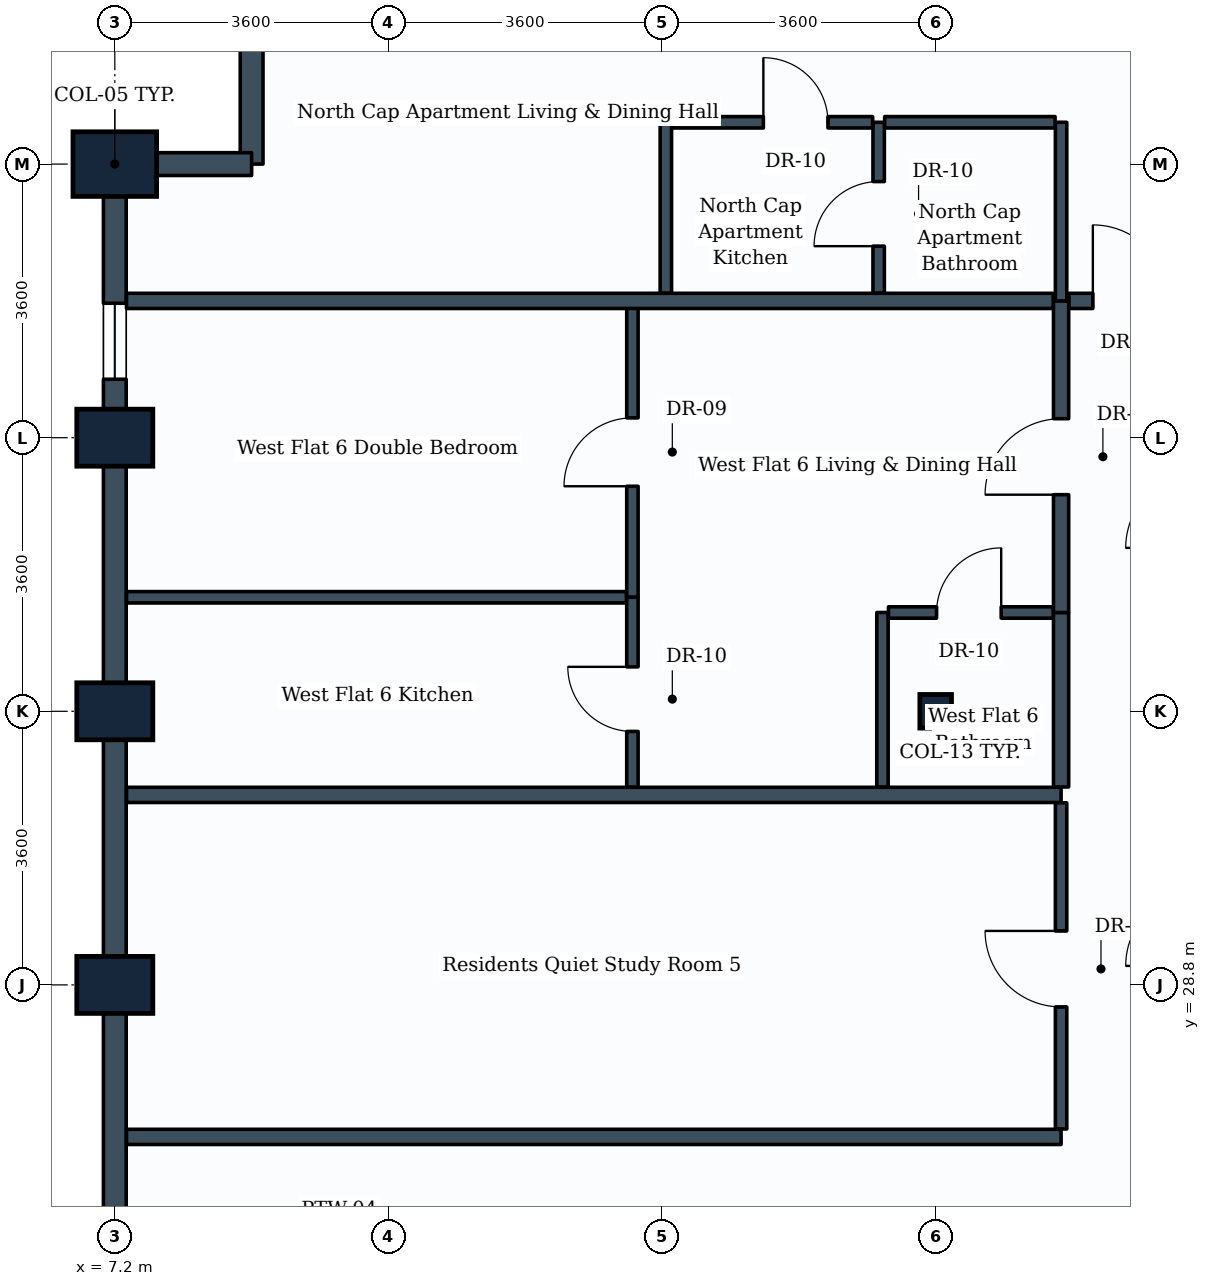
"""IFC4 building model, lengths in metres.
Left out: names, types, materials, properties, quantities, classifications, styles, units other than length and angle.
Written with IfcOpenShell. Run it as: python <this file> out.ifc"""

import sys

from ifc_helpers import new_model, si_unit, direction, frame, frame_2d, origin, origin_2d, place, context, subcontext, project, spatial, rectangle, i_section, extrude, element, fill, save


model = new_model("IFC4")
c1 = context("Model", 3, precision=1e-05, world=origin(), true_north=direction((0.0, 1.0)))
c2 = subcontext(c1, "Body", "Model", "MODEL_VIEW")
j1 = project(units=[si_unit("LENGTHUNIT", "METRE"), si_unit("PLANEANGLEUNIT", "RADIAN")], contexts=[c1])
p1 = place(None, origin())
s1 = spatial("IfcSite", under=j1, at=p1, CompositionType="ELEMENT")
p2 = place(p1, origin())
s2 = spatial("IfcBuilding", under=s1, at=p2, CompositionType="ELEMENT")
p3 = place(p2, frame((0.0, 0.0, 142.8)))
s3 = spatial("IfcBuildingStorey", under=s2, at=p3, CompositionType="ELEMENT", Elevation=142.8)
for number, where, z_axis, x_axis in (
    (1, (7.2, 28.8, 0.0), (0.0, 0.0, 1.0), (0.0, 1.0, 0.0)),
    (2, (7.2, 32.4, 0.0), (0.0, 0.0, 1.0), (0.0, 1.0, 0.0)),
    (3, (7.2, 36.0, 0.0), (0.0, 0.0, 1.0), (0.0, 1.0, 0.0)),
):
    element("IfcColumn", number, at=place(p3, frame(where, z_axis=z_axis, x_axis=x_axis)), inside=s3, PredefinedType="COLUMN", context=c2, shape_type="SweptSolid", body=[
        extrude(rectangle(XDim=0.75, YDim=1.0, at=origin_2d()), origin(), (0.0, 0.0, 1.0), 3.8),
    ])
p4 = place(p3, frame((7.2, 39.6, 0.0), z_axis=(0.0, 0.0, 1.0), x_axis=(0.0, 1.0, 0.0)))
e4 = element("IfcColumn", 4, at=p4, inside=s3, PredefinedType="COLUMN", context=c2, shape_type="SweptSolid", body=[
    extrude(rectangle(XDim=0.85, YDim=1.1, at=origin_2d()), origin(), (0.0, 0.0, 1.0), 3.8),
])
p5 = place(p3, frame((18.0, 32.4, 0.0), z_axis=(0.0, 0.0, 1.0), x_axis=(1.0, 0.0, 0.0)))
e5 = element("IfcColumn", 5, at=p5, inside=s3, PredefinedType="COLUMN", context=c2, shape_type="SweptSolid", body=[
    extrude(i_section(OverallWidth=0.416, OverallDepth=0.442, WebThickness=0.025, FlangeThickness=0.041, FilletRadius=0.015, at=origin_2d()), origin(), (0.0, 0.0, 1.0), 3.8),
])
p6 = place(p3, frame((9.0, 39.6, 0.0), z_axis=(0.0, 0.0, 1.0), x_axis=(0.0, 1.0, 0.0)))
e6 = element("IfcWall", 6, at=p6, inside=s3, PredefinedType="STANDARD", context=c2, shape_type="SweptSolid", body=[
    extrude(rectangle(XDim=1.8, YDim=0.3, at=frame_2d((0.9, 0.0))), origin(), (0.0, 0.0, 1.0), 3.535),
])
p7 = place(p3, frame((7.2, 39.6, 0.0), z_axis=(0.0, 0.0, 1.0), x_axis=(1.0, 0.0, 0.0)))
e7 = element("IfcWall", 7, at=p7, inside=s3, PredefinedType="STANDARD", context=c2, shape_type="SweptSolid", body=[
    extrude(rectangle(XDim=1.8, YDim=0.3, at=frame_2d((0.9, 0.0))), origin(), (0.0, 0.0, 1.0), 2.93),
])
p8 = place(p3, frame((7.2, 36.0, 0.0), z_axis=(0.0, 0.0, 1.0), x_axis=(0.0, 1.0, 0.0)))
e8 = element("IfcWall", 8, at=p8, inside=s3, PredefinedType="STANDARD", context=c2, shape_type="SweptSolid", body=[
    extrude(rectangle(XDim=3.6, YDim=0.3, at=frame_2d((1.8, 0.0))), origin(), (0.0, 0.0, 1.0), 2.93),
])
p9 = place(p8, frame((0.769, 0.0, 0.85)))
e9 = element("IfcOpeningElement", 9, at=p9, cuts=e8, PredefinedType="OPENING", context=c2, shape_type="SweptSolid", body=[
    extrude(rectangle(XDim=1.0, YDim=1.35, at=frame_2d((0.5, 0.675))), frame((0.0, 0.16, 0.0), z_axis=(0.0, -1.0, 0.0), x_axis=(1.0, 0.0, 0.0)), (0.0, 0.0, 1.0), 0.32),
])
p10 = place(p3, frame((7.2, 32.4, 0.0), z_axis=(0.0, 0.0, 1.0), x_axis=(0.0, 1.0, 0.0)))
e10 = element("IfcWall", 10, at=p10, inside=s3, PredefinedType="STANDARD", context=c2, shape_type="SweptSolid", body=[
    extrude(rectangle(XDim=3.6, YDim=0.3, at=frame_2d((1.8, 0.0))), origin(), (0.0, 0.0, 1.0), 2.93),
])
p11 = place(p3, frame((7.2, 28.8, 0.0), z_axis=(0.0, 0.0, 1.0), x_axis=(0.0, 1.0, 0.0)))
e11 = element("IfcWall", 11, at=p11, inside=s3, PredefinedType="STANDARD", context=c2, shape_type="SweptSolid", body=[
    extrude(rectangle(XDim=3.6, YDim=0.3, at=frame_2d((1.8, 0.0))), origin(), (0.0, 0.0, 1.0), 2.93),
])
p12 = place(p3, frame((7.2, 25.2, 0.0), z_axis=(0.0, 0.0, 1.0), x_axis=(0.0, 1.0, 0.0)))
e12 = element("IfcWall", 12, at=p12, inside=s3, PredefinedType="STANDARD", context=c2, shape_type="SweptSolid", body=[
    extrude(rectangle(XDim=3.6, YDim=0.3, at=frame_2d((1.8, 0.0))), origin(), (0.0, 0.0, 1.0), 2.93),
])
for number, where, z_axis, x_axis in (
    (13, (7.354, 26.8, 0.0), (0.0, 0.0, 1.0), (1.0, 0.0, 0.0)),
    (14, (7.354, 31.3, 0.0), (0.0, 0.0, 1.0), (1.0, 0.0, 0.0)),
):
    element("IfcWall", number, at=place(p3, frame(where, z_axis=z_axis, x_axis=x_axis)), inside=s3, PredefinedType="PARTITIONING", context=c2, shape_type="SweptSolid", body=[
        extrude(rectangle(XDim=12.296, YDim=0.2, at=frame_2d((6.148, 0.0))), origin(), (0.0, 0.0, 1.0), 2.93),
    ])
p13 = place(p3, frame((19.65, 26.904, 0.0), z_axis=(0.0, 0.0, 1.0), x_axis=(0.0, 1.0, 0.0)))
e15 = element("IfcWall", 15, at=p13, inside=s3, PredefinedType="PARTITIONING", context=c2, shape_type="SweptSolid", body=[
    extrude(rectangle(XDim=4.292, YDim=0.15, at=frame_2d((2.146, 0.0))), origin(), (0.0, 0.0, 1.0), 3.17),
])
p14 = place(p13, frame((1.606, 0.0, 0.0)))
e16 = element("IfcOpeningElement", 16, at=p14, cuts=e15, PredefinedType="OPENING", context=c2, shape_type="SweptSolid", body=[
    extrude(rectangle(XDim=1.0, YDim=2.1, at=frame_2d((0.5, 1.05))), frame((0.0, 0.085, 0.0), z_axis=(0.0, -1.0, 0.0), x_axis=(1.0, 0.0, 0.0)), (0.0, 0.0, 1.0), 0.17),
])
p15 = place(p3, frame((19.65, 31.404, 0.0), z_axis=(0.0, 0.0, 1.0), x_axis=(0.0, 1.0, 0.0)))
e17 = element("IfcWall", 17, at=p15, inside=s3, PredefinedType="PARTITIONING", context=c2, shape_type="SweptSolid", body=[
    extrude(rectangle(XDim=2.296, YDim=0.2, at=frame_2d((1.148, 0.0))), origin(), (0.0, 0.0, 1.0), 3.18),
])
p16 = place(p3, frame((17.3, 31.404, 0.0), z_axis=(0.0, 0.0, 1.0), x_axis=(0.0, 1.0, 0.0)))
e18 = element("IfcWall", 18, at=p16, inside=s3, PredefinedType="PARTITIONING", context=c2, shape_type="SweptSolid", body=[
    extrude(rectangle(XDim=2.296, YDim=0.15, at=frame_2d((1.148, 0.0))), origin(), (0.0, 0.0, 1.0), 3.18),
])
p17 = place(p3, frame((17.379, 33.7, 0.0), z_axis=(0.0, 0.0, 1.0), x_axis=(1.0, 0.0, 0.0)))
e19 = element("IfcWall", 19, at=p17, inside=s3, PredefinedType="PARTITIONING", context=c2, shape_type="SweptSolid", body=[
    extrude(rectangle(XDim=2.167, YDim=0.15, at=frame_2d((1.083, 0.0))), origin(), (0.0, 0.0, 1.0), 3.17),
])
p18 = place(p17, frame((0.633, 0.0, 0.0)))
e20 = element("IfcOpeningElement", 20, at=p18, cuts=e19, PredefinedType="OPENING", context=c2, shape_type="SweptSolid", body=[
    extrude(rectangle(XDim=0.85, YDim=2.1, at=frame_2d((0.425, 1.05))), frame((0.0, 0.085, 0.0), z_axis=(0.0, -1.0, 0.0), x_axis=(1.0, 0.0, 0.0)), (0.0, 0.0, 1.0), 0.17),
])
p19 = place(p3, frame((19.65, 33.7, 0.0), z_axis=(0.0, 0.0, 1.0), x_axis=(0.0, 1.0, 0.0)))
e21 = element("IfcWall", 21, at=p19, inside=s3, PredefinedType="PARTITIONING", context=c2, shape_type="SweptSolid", body=[
    extrude(rectangle(XDim=4.1, YDim=0.2, at=frame_2d((2.05, 0.0))), origin(), (0.0, 0.0, 1.0), 3.17),
])
p20 = place(p19, frame((1.55, 0.0, 0.0)))
e22 = element("IfcOpeningElement", 22, at=p20, cuts=e21, PredefinedType="OPENING", context=c2, shape_type="SweptSolid", body=[
    extrude(rectangle(XDim=1.0, YDim=2.1, at=frame_2d((0.5, 1.05))), frame((0.0, 0.11, 0.0), z_axis=(0.0, -1.0, 0.0), x_axis=(1.0, 0.0, 0.0)), (0.0, 0.0, 1.0), 0.22),
])
p21 = place(p3, frame((14.01, 33.9, 0.0), z_axis=(0.0, 0.0, 1.0), x_axis=(0.0, 1.0, 0.0)))
e23 = element("IfcWall", 23, at=p21, inside=s3, PredefinedType="PARTITIONING", context=c2, shape_type="SweptSolid", body=[
    extrude(rectangle(XDim=3.9, YDim=0.15, at=frame_2d((1.95, 0.0))), origin(), (0.0, 0.0, 1.0), 3.17),
])
p22 = place(p21, frame((1.461, 0.0, 0.0)))
e24 = element("IfcOpeningElement", 24, at=p22, cuts=e23, PredefinedType="OPENING", context=c2, shape_type="SweptSolid", body=[
    extrude(rectangle(XDim=0.9, YDim=2.1, at=frame_2d((0.45, 1.05))), frame((0.0, 0.085, 0.0), z_axis=(0.0, -1.0, 0.0), x_axis=(1.0, 0.0, 0.0)), (0.0, 0.0, 1.0), 0.17),
])
p23 = place(p3, frame((14.01, 31.404, 0.0), z_axis=(0.0, 0.0, 1.0), x_axis=(0.0, 1.0, 0.0)))
e25 = element("IfcWall", 25, at=p23, inside=s3, PredefinedType="PARTITIONING", context=c2, shape_type="SweptSolid", body=[
    extrude(rectangle(XDim=2.496, YDim=0.15, at=frame_2d((1.248, 0.0))), origin(), (0.0, 0.0, 1.0), 3.18),
])
p24 = place(p23, frame((0.731, 0.0, 0.0)))
e26 = element("IfcOpeningElement", 26, at=p24, cuts=e25, PredefinedType="OPENING", context=c2, shape_type="SweptSolid", body=[
    extrude(rectangle(XDim=0.85, YDim=2.1, at=frame_2d((0.425, 1.05))), frame((0.0, 0.085, 0.0), z_axis=(0.0, -1.0, 0.0), x_axis=(1.0, 0.0, 0.0)), (0.0, 0.0, 1.0), 0.17),
])
p25 = place(p3, frame((7.354, 33.9, 0.0), z_axis=(0.0, 0.0, 1.0), x_axis=(1.0, 0.0, 0.0)))
e27 = element("IfcWall", 27, at=p25, inside=s3, PredefinedType="PARTITIONING", context=c2, shape_type="SweptSolid", body=[
    extrude(rectangle(XDim=6.577, YDim=0.15, at=frame_2d((3.289, 0.0))), origin(), (0.0, 0.0, 1.0), 2.93),
])
p26 = place(p3, frame((7.354, 37.8, 0.0), z_axis=(0.0, 0.0, 1.0), x_axis=(1.0, 0.0, 0.0)))
e28 = element("IfcWall", 28, at=p26, inside=s3, PredefinedType="PARTITIONING", context=c2, shape_type="SweptSolid", body=[
    extrude(rectangle(XDim=12.192, YDim=0.2, at=frame_2d((6.096, 0.0))), origin(), (0.0, 0.0, 1.0), 2.93),
])
p27 = place(p3, frame((19.754, 37.8, 0.0), z_axis=(0.0, 0.0, 1.0), x_axis=(1.0, 0.0, 0.0)))
e29 = element("IfcWall", 29, at=p27, inside=s3, PredefinedType="PARTITIONING", context=c2, shape_type="SweptSolid", body=[
    extrude(rectangle(XDim=1.667, YDim=0.2, at=frame_2d((0.833, 0.0))), origin(), (0.0, 0.0, 1.0), 3.535),
])
p28 = place(p27, frame((0.314, 0.0, 0.0)))
e30 = element("IfcOpeningElement", 30, at=p28, cuts=e29, PredefinedType="OPENING", context=c2, shape_type="SweptSolid", body=[
    extrude(rectangle(XDim=1.0, YDim=2.1, at=frame_2d((0.5, 1.05))), frame((0.0, 0.11, 0.0), z_axis=(0.0, -1.0, 0.0), x_axis=(1.0, 0.0, 0.0)), (0.0, 0.0, 1.0), 0.22),
])
p29 = place(p3, frame((19.65, 37.8, 0.0), z_axis=(0.0, 0.0, 1.0), x_axis=(0.0, 1.0, 0.0)))
e31 = element("IfcWall", 31, at=p29, inside=s3, PredefinedType="PARTITIONING", context=c2, shape_type="SweptSolid", body=[
    extrude(rectangle(XDim=2.35, YDim=0.15, at=frame_2d((1.175, 0.0))), origin(), (0.0, 0.0, 1.0), 3.535),
])
p30 = place(p3, frame((17.25, 37.904, 0.0), z_axis=(0.0, 0.0, 1.0), x_axis=(0.0, 1.0, 0.0)))
e32 = element("IfcWall", 32, at=p30, inside=s3, PredefinedType="PARTITIONING", context=c2, shape_type="SweptSolid", body=[
    extrude(rectangle(XDim=2.246, YDim=0.15, at=frame_2d((1.123, 0.0))), origin(), (0.0, 0.0, 1.0), 3.535),
])
p31 = place(p30, frame((0.616, 0.0, 0.0)))
e33 = element("IfcOpeningElement", 33, at=p31, cuts=e32, PredefinedType="OPENING", context=c2, shape_type="SweptSolid", body=[
    extrude(rectangle(XDim=0.85, YDim=2.1, at=frame_2d((0.425, 1.05))), frame((0.0, 0.085, 0.0), z_axis=(0.0, -1.0, 0.0), x_axis=(1.0, 0.0, 0.0)), (0.0, 0.0, 1.0), 0.17),
])
p32 = place(p3, frame((17.329, 40.15, 0.0), z_axis=(0.0, 0.0, 1.0), x_axis=(1.0, 0.0, 0.0)))
e34 = element("IfcWall", 34, at=p32, inside=s3, PredefinedType="PARTITIONING", context=c2, shape_type="SweptSolid", body=[
    extrude(rectangle(XDim=2.242, YDim=0.15, at=frame_2d((1.121, 0.0))), origin(), (0.0, 0.0, 1.0), 3.17),
])
p33 = place(p3, frame((14.45, 37.904, 0.0), z_axis=(0.0, 0.0, 1.0), x_axis=(0.0, 1.0, 0.0)))
e35 = element("IfcWall", 35, at=p33, inside=s3, PredefinedType="PARTITIONING", context=c2, shape_type="SweptSolid", body=[
    extrude(rectangle(XDim=2.246, YDim=0.15, at=frame_2d((1.123, 0.0))), origin(), (0.0, 0.0, 1.0), 3.535),
])
p34 = place(p3, frame((14.529, 40.15, 0.0), z_axis=(0.0, 0.0, 1.0), x_axis=(1.0, 0.0, 0.0)))
e36 = element("IfcWall", 36, at=p34, inside=s3, PredefinedType="PARTITIONING", context=c2, shape_type="SweptSolid", body=[
    extrude(rectangle(XDim=2.642, YDim=0.15, at=frame_2d((1.321, 0.0))), origin(), (0.0, 0.0, 1.0), 3.535),
])
p35 = place(p34, frame((1.204, 0.0, 0.0)))
e37 = element("IfcOpeningElement", 37, at=p35, cuts=e36, PredefinedType="OPENING", context=c2, shape_type="SweptSolid", body=[
    extrude(rectangle(XDim=0.85, YDim=2.1, at=frame_2d((0.425, 1.05))), frame((0.0, 0.085, 0.0), z_axis=(0.0, -1.0, 0.0), x_axis=(1.0, 0.0, 0.0)), (0.0, 0.0, 1.0), 0.17),
])
p36 = place(p14, origin())
e38 = element("IfcDoor", 38, at=p36, inside=s3, OperationType="SINGLE_SWING_RIGHT", PredefinedType="DOOR", context=c2, shape_type="SweptSolid", body=[
    extrude(rectangle(XDim=1.0, YDim=2.1, at=frame_2d((0.5, 1.05))), frame((0.0, 0.025, 0.0), z_axis=(0.0, -1.0, 0.0), x_axis=(1.0, 0.0, 0.0)), (0.0, 0.0, 1.0), 0.05),
])
fill(e16, e38)
p37 = place(p18, origin())
e39 = element("IfcDoor", 39, at=p37, inside=s3, OperationType="SINGLE_SWING_RIGHT", PredefinedType="DOOR", context=c2, shape_type="SweptSolid", body=[
    extrude(rectangle(XDim=0.85, YDim=2.1, at=frame_2d((0.425, 1.05))), frame((0.0, 0.025, 0.0), z_axis=(0.0, -1.0, 0.0), x_axis=(1.0, 0.0, 0.0)), (0.0, 0.0, 1.0), 0.05),
])
fill(e20, e39)
p38 = place(p20, origin())
e40 = element("IfcDoor", 40, at=p38, inside=s3, OperationType="SINGLE_SWING_LEFT", PredefinedType="DOOR", context=c2, shape_type="SweptSolid", body=[
    extrude(rectangle(XDim=1.0, YDim=2.1, at=frame_2d((0.5, 1.05))), frame((0.0, 0.025, 0.0), z_axis=(0.0, -1.0, 0.0), x_axis=(1.0, 0.0, 0.0)), (0.0, 0.0, 1.0), 0.05),
])
fill(e22, e40)
p39 = place(p22, origin())
e41 = element("IfcDoor", 41, at=p39, inside=s3, OperationType="SINGLE_SWING_LEFT", PredefinedType="DOOR", context=c2, shape_type="SweptSolid", body=[
    extrude(rectangle(XDim=0.9, YDim=2.1, at=frame_2d((0.45, 1.05))), frame((0.0, 0.025, 0.0), z_axis=(0.0, -1.0, 0.0), x_axis=(1.0, 0.0, 0.0)), (0.0, 0.0, 1.0), 0.05),
])
fill(e24, e41)
p40 = place(p24, origin())
e42 = element("IfcDoor", 42, at=p40, inside=s3, OperationType="SINGLE_SWING_RIGHT", PredefinedType="DOOR", context=c2, shape_type="SweptSolid", body=[
    extrude(rectangle(XDim=0.85, YDim=2.1, at=frame_2d((0.425, 1.05))), frame((0.0, 0.025, 0.0), z_axis=(0.0, -1.0, 0.0), x_axis=(1.0, 0.0, 0.0)), (0.0, 0.0, 1.0), 0.05),
])
fill(e26, e42)
p41 = place(p28, origin())
e43 = element("IfcDoor", 43, at=p41, inside=s3, OperationType="SINGLE_SWING_LEFT", PredefinedType="DOOR", context=c2, shape_type="SweptSolid", body=[
    extrude(rectangle(XDim=1.0, YDim=2.1, at=frame_2d((0.5, 1.05))), frame((0.0, 0.025, 0.0), z_axis=(0.0, -1.0, 0.0), x_axis=(1.0, 0.0, 0.0)), (0.0, 0.0, 1.0), 0.05),
])
fill(e30, e43)
p42 = place(p31, origin())
e44 = element("IfcDoor", 44, at=p42, inside=s3, OperationType="SINGLE_SWING_LEFT", PredefinedType="DOOR", context=c2, shape_type="SweptSolid", body=[
    extrude(rectangle(XDim=0.85, YDim=2.1, at=frame_2d((0.425, 1.05))), frame((0.0, 0.025, 0.0), z_axis=(0.0, -1.0, 0.0), x_axis=(1.0, 0.0, 0.0)), (0.0, 0.0, 1.0), 0.05),
])
fill(e33, e44)
p43 = place(p35, origin())
e45 = element("IfcDoor", 45, at=p43, inside=s3, OperationType="SINGLE_SWING_LEFT", PredefinedType="DOOR", context=c2, shape_type="SweptSolid", body=[
    extrude(rectangle(XDim=0.85, YDim=2.1, at=frame_2d((0.425, 1.05))), frame((0.0, 0.025, 0.0), z_axis=(0.0, -1.0, 0.0), x_axis=(1.0, 0.0, 0.0)), (0.0, 0.0, 1.0), 0.05),
])
fill(e37, e45)
p44 = place(p9, origin())
e46 = element("IfcWindow", 46, at=p44, inside=s3, PartitioningType="SINGLE_PANEL", PredefinedType="WINDOW", context=c2, shape_type="SweptSolid", body=[
    extrude(rectangle(XDim=1.0, YDim=1.35, at=frame_2d((0.5, 0.675))), frame((0.0, 0.03, 0.0), z_axis=(0.0, -1.0, 0.0), x_axis=(1.0, 0.0, 0.0)), (0.0, 0.0, 1.0), 0.06),
])
fill(e9, e46)
save(model, sys.argv[1])
